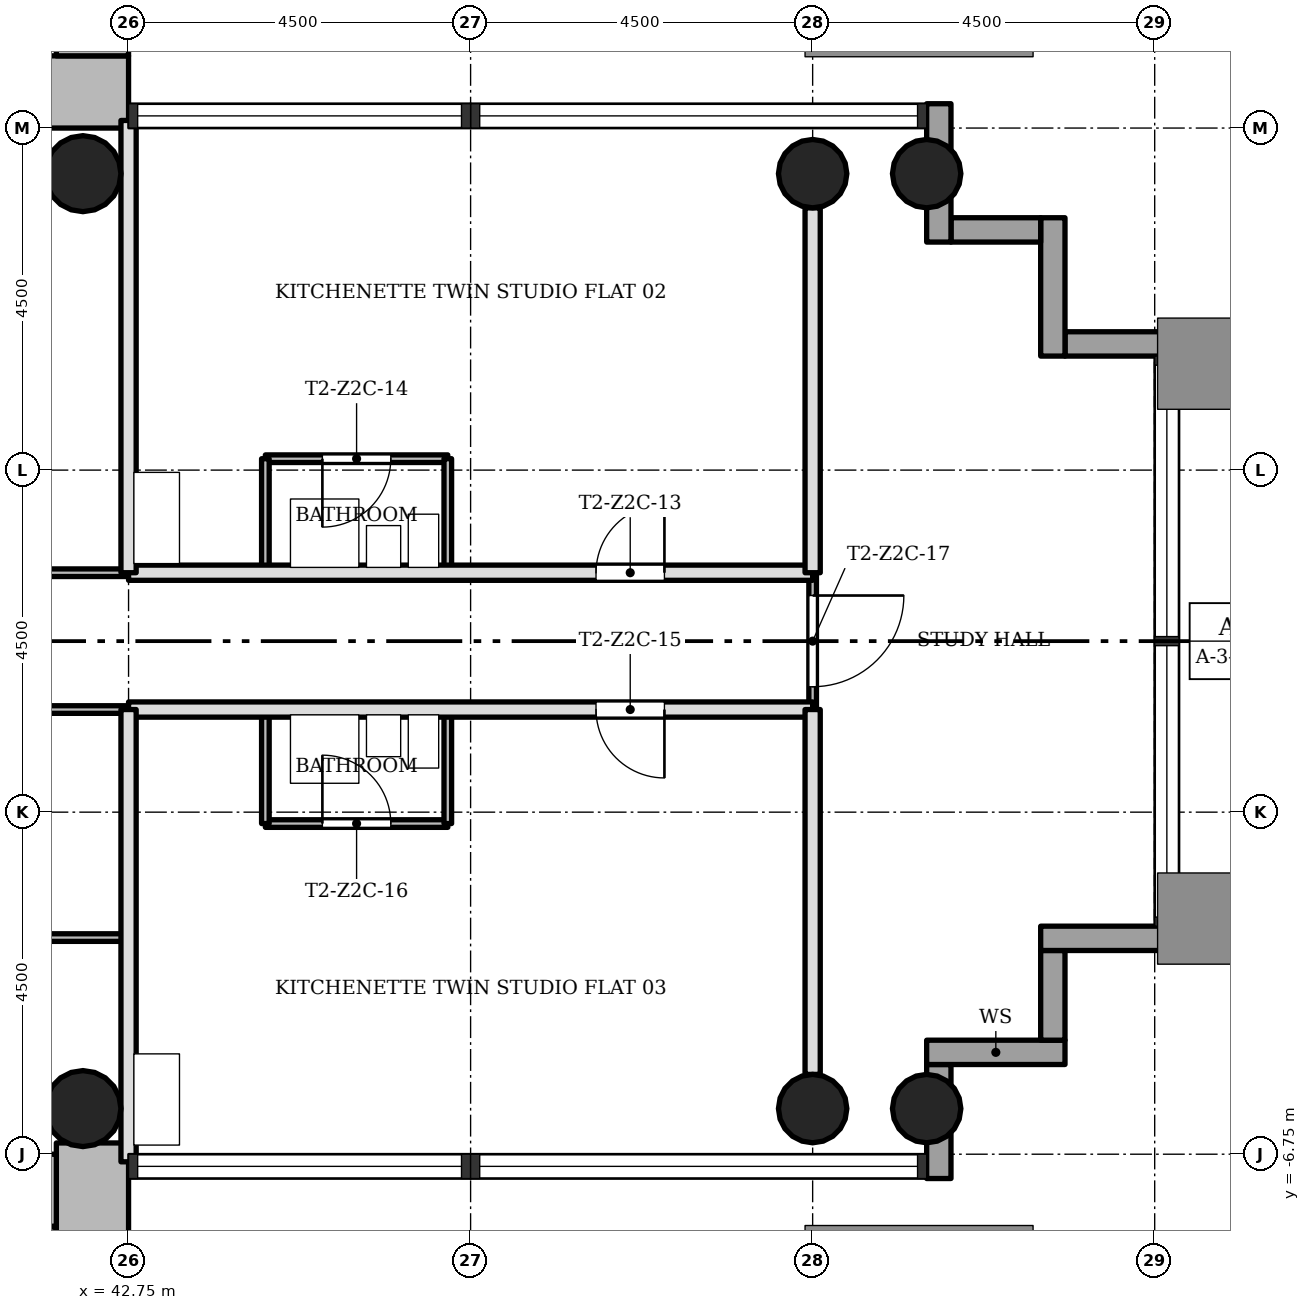
"""IFC4 building model, lengths in metres.
Left out: names, types, materials, properties, quantities, classifications, styles, units other than length and angle.
Written with IfcOpenShell. Run it as: python <this file> out.ifc"""

import sys

from ifc_helpers import new_model, si_unit, direction, frame, frame_2d, origin, origin_2d, place, context, subcontext, project, spatial, rectangle, hollow_circle, extrude, element, fill, save


model = new_model("IFC4")
c1 = context("Model", 3, precision=1e-05, world=origin(), true_north=direction((0.0, 1.0)))
c2 = subcontext(c1, "Body", "Model", "MODEL_VIEW")
j1 = project(units=[si_unit("LENGTHUNIT", "METRE"), si_unit("PLANEANGLEUNIT", "RADIAN")], contexts=[c1])
p1 = place(None, origin())
s1 = spatial("IfcSite", under=j1, at=p1, CompositionType="ELEMENT")
p2 = place(p1, origin())
s2 = spatial("IfcBuilding", under=s1, at=p2, CompositionType="ELEMENT")
p3 = place(p2, frame((0.0, 0.0, 86.8)))
s3 = spatial("IfcBuildingStorey", under=s2, at=p3, CompositionType="ELEMENT", Elevation=86.8)
p4 = place(p3, frame((30.2, 7.225, 0.0), z_axis=(0.0, 0.0, 1.0), x_axis=(1.0, 0.0, 0.0)))
e1 = element("IfcWall", 1, at=p4, inside=s3, PredefinedType="SHEAR", context=c2, shape_type="SweptSolid", body=[
    extrude(rectangle(XDim=12.55, YDim=0.95, at=frame_2d((6.275, 0.0))), origin(), (0.0, 0.0, 1.0), 3.4),
])
p5 = place(p4, frame((4.9, 0.0, 0.0)))
e2 = element("IfcOpeningElement", 2, at=p5, cuts=e1, PredefinedType="OPENING", context=c2, shape_type="SweptSolid", body=[
    extrude(rectangle(XDim=1.8, YDim=2.1, at=frame_2d((0.9, 1.05))), frame((0.0, 0.485, 0.0), z_axis=(0.0, -1.0, 0.0), x_axis=(1.0, 0.0, 0.0)), (0.0, 0.0, 1.0), 0.97),
])
p6 = place(p3, frame((42.275, 7.7, 0.0), z_axis=(0.0, 0.0, 1.0), x_axis=(0.0, 1.0, 0.0)))
e3 = element("IfcWall", 3, at=p6, inside=s3, PredefinedType="SHEAR", context=c2, shape_type="SweptSolid", body=[
    extrude(rectangle(XDim=8.05, YDim=0.95, at=frame_2d((4.025, 0.0))), origin(), (0.0, 0.0, 1.0), 3.4),
])
p7 = place(p3, frame((42.275, -14.8, 0.0), z_axis=(0.0, 0.0, 1.0), x_axis=(0.0, 1.0, 0.0)))
e4 = element("IfcWall", 4, at=p7, inside=s3, PredefinedType="SHEAR", context=c2, shape_type="SweptSolid", body=[
    extrude(rectangle(XDim=8.198, YDim=0.95, at=frame_2d((4.099, 0.0))), origin(), (0.0, 0.0, 1.0), 3.4),
])
p8 = place(p3, frame((41.8, -7.225, 0.0), z_axis=(0.0, 0.0, 1.0), x_axis=(-1.0, 0.0, 0.0)))
e5 = element("IfcWall", 5, at=p8, inside=s3, PredefinedType="SHEAR", context=c2, shape_type="SweptSolid", body=[
    extrude(rectangle(XDim=12.55, YDim=0.95, at=frame_2d((6.275, 0.0))), origin(), (0.0, 0.0, 1.0), 3.4),
])
p9 = place(p8, frame((4.9, 0.0, 0.0)))
e6 = element("IfcOpeningElement", 6, at=p9, cuts=e5, PredefinedType="OPENING", context=c2, shape_type="SweptSolid", body=[
    extrude(rectangle(XDim=1.8, YDim=2.1, at=frame_2d((0.9, 1.05))), frame((0.0, 0.485, 0.0), z_axis=(0.0, -1.0, 0.0), x_axis=(1.0, 0.0, 0.0)), (0.0, 0.0, 1.0), 0.97),
])
for number, where, z_axis, x_axis in (
    (7, (51.75, -6.15, 0.0), (0.0, 0.0, 1.0), (1.0, 0.0, 0.0)),
    (8, (51.75, 6.15, 0.0), (0.0, 0.0, 1.0), (1.0, 0.0, 0.0)),
    (9, (53.25, -6.15, 0.0), (0.0, 0.0, 1.0), (1.0, 0.0, 0.0)),
    (10, (53.25, 6.15, 0.0), (0.0, 0.0, 1.0), (1.0, 0.0, 0.0)),
):
    element("IfcColumn", number, at=place(p3, frame(where, z_axis=z_axis, x_axis=x_axis)), inside=s3, PredefinedType="COLUMN", context=c2, shape_type="SweptSolid", body=[
        extrude(hollow_circle(Radius=0.45, WallThickness=0.032, at=origin_2d()), origin(), (0.0, 0.0, 1.0), 3.4),
    ])
for number, where, z_axis, x_axis in (
    (11, (42.15, -6.15, 0.0), (0.0, 0.0, 1.0), (1.0, 0.0, 0.0)),
    (12, (42.15, 6.15, 0.0), (0.0, 0.0, 1.0), (1.0, 0.0, 0.0)),
):
    element("IfcColumn", number, at=place(p3, frame(where, z_axis=z_axis, x_axis=x_axis)), inside=s3, PredefinedType="COLUMN", context=c2, shape_type="SweptSolid", body=[
        extrude(hollow_circle(Radius=0.5, WallThickness=0.036, at=origin_2d()), origin(), (0.0, 0.0, 1.0), 3.4),
    ])
p10 = place(p3, frame((53.41, -7.07, -0.3), z_axis=(0.0, 0.0, 1.0), x_axis=(0.0, 1.0, 0.0)))
e13 = element("IfcWall", 13, at=p10, inside=s3, PredefinedType="STANDARD", context=c2, shape_type="SweptSolid", body=[
    extrude(rectangle(XDim=1.5, YDim=0.32, at=frame_2d((0.75, 0.0))), origin(), (0.0, 0.0, 1.0), 3.4),
])
p11 = place(p3, frame((53.25, -5.41, -0.3), z_axis=(0.0, 0.0, 1.0), x_axis=(1.0, 0.0, 0.0)))
e14 = element("IfcWall", 14, at=p11, inside=s3, PredefinedType="STANDARD", context=c2, shape_type="SweptSolid", body=[
    extrude(rectangle(XDim=1.82, YDim=0.32, at=frame_2d((0.91, 0.0))), origin(), (0.0, 0.0, 1.0), 3.4),
])
p12 = place(p3, frame((54.91, -5.25, -0.3), z_axis=(0.0, 0.0, 1.0), x_axis=(0.0, 1.0, 0.0)))
e15 = element("IfcWall", 15, at=p12, inside=s3, PredefinedType="STANDARD", context=c2, shape_type="SweptSolid", body=[
    extrude(rectangle(XDim=1.18, YDim=0.32, at=frame_2d((0.59, 0.0))), origin(), (0.0, 0.0, 1.0), 3.4),
])
p13 = place(p3, frame((54.75, -3.91, -0.3), z_axis=(0.0, 0.0, 1.0), x_axis=(1.0, 0.0, 0.0)))
e16 = element("IfcWall", 16, at=p13, inside=s3, PredefinedType="STANDARD", context=c2, shape_type="SweptSolid", body=[
    extrude(rectangle(XDim=1.82, YDim=0.32, at=frame_2d((0.91, 0.0))), origin(), (0.0, 0.0, 1.0), 3.4),
])
p14 = place(p3, frame((56.57, 3.91, -0.3), z_axis=(0.0, 0.0, 1.0), x_axis=(-1.0, 0.0, 0.0)))
e17 = element("IfcWall", 17, at=p14, inside=s3, PredefinedType="STANDARD", context=c2, shape_type="SweptSolid", body=[
    extrude(rectangle(XDim=1.5, YDim=0.32, at=frame_2d((0.75, 0.0))), origin(), (0.0, 0.0, 1.0), 3.4),
])
p15 = place(p3, frame((54.91, 3.75, -0.3), z_axis=(0.0, 0.0, 1.0), x_axis=(0.0, 1.0, 0.0)))
e18 = element("IfcWall", 18, at=p15, inside=s3, PredefinedType="STANDARD", context=c2, shape_type="SweptSolid", body=[
    extrude(rectangle(XDim=1.82, YDim=0.32, at=frame_2d((0.91, 0.0))), origin(), (0.0, 0.0, 1.0), 3.4),
])
p16 = place(p3, frame((54.75, 5.41, -0.3), z_axis=(0.0, 0.0, 1.0), x_axis=(-1.0, 0.0, 0.0)))
e19 = element("IfcWall", 19, at=p16, inside=s3, PredefinedType="STANDARD", context=c2, shape_type="SweptSolid", body=[
    extrude(rectangle(XDim=1.18, YDim=0.32, at=frame_2d((0.59, 0.0))), origin(), (0.0, 0.0, 1.0), 3.4),
])
p17 = place(p3, frame((53.41, 5.25, -0.3), z_axis=(0.0, 0.0, 1.0), x_axis=(0.0, 1.0, 0.0)))
e20 = element("IfcWall", 20, at=p17, inside=s3, PredefinedType="STANDARD", context=c2, shape_type="SweptSolid", body=[
    extrude(rectangle(XDim=1.82, YDim=0.32, at=frame_2d((0.91, 0.0))), origin(), (0.0, 0.0, 1.0), 3.4),
])
p18 = place(p3, frame((42.75, -3.9, 0.0), z_axis=(0.0, 0.0, 1.0), x_axis=(-1.0, 0.0, 0.0)))
e21 = element("IfcWall", 21, at=p18, inside=s3, PredefinedType="PARTITIONING", context=c2, shape_type="SweptSolid", body=[
    extrude(rectangle(XDim=5.25, YDim=0.1, at=frame_2d((2.625, 0.0))), origin(), (0.0, 0.0, 1.0), 3.0),
])
p19 = place(p3, frame((46.95, -2.4, 0.0), z_axis=(0.0, 0.0, 1.0), x_axis=(-1.0, 0.0, 0.0)))
e22 = element("IfcWall", 22, at=p19, inside=s3, PredefinedType="PARTITIONING", context=c2, shape_type="SweptSolid", body=[
    extrude(rectangle(XDim=2.4, YDim=0.1, at=frame_2d((1.2, 0.0))), origin(), (0.0, 0.0, 1.0), 3.0),
])
p20 = place(p19, frame((0.75, 0.0, 0.0)))
e23 = element("IfcOpeningElement", 23, at=p20, cuts=e22, PredefinedType="OPENING", context=c2, shape_type="SweptSolid", body=[
    extrude(rectangle(XDim=0.9, YDim=2.1, at=frame_2d((0.45, 1.05))), frame((0.0, 0.06, 0.0), z_axis=(0.0, -1.0, 0.0), x_axis=(1.0, 0.0, 0.0)), (0.0, 0.0, 1.0), 0.12),
])
p21 = place(p3, frame((42.75, -0.9, 0.0), z_axis=(0.0, 0.0, 1.0), x_axis=(-1.0, 0.0, 0.0)))
e24 = element("IfcWall", 24, at=p21, inside=s3, PredefinedType="PARTITIONING", context=c2, shape_type="SweptSolid", body=[
    extrude(rectangle(XDim=5.25, YDim=0.1, at=frame_2d((2.625, 0.0))), origin(), (0.0, 0.0, 1.0), 3.0),
])
p22 = place(p21, frame((2.175, 0.0, 0.0)))
e25 = element("IfcOpeningElement", 25, at=p22, cuts=e24, PredefinedType="OPENING", context=c2, shape_type="SweptSolid", body=[
    extrude(rectangle(XDim=0.9, YDim=2.1, at=frame_2d((0.45, 1.05))), frame((0.0, 0.06, 0.0), z_axis=(0.0, -1.0, 0.0), x_axis=(1.0, 0.0, 0.0)), (0.0, 0.0, 1.0), 0.12),
])
p23 = place(p3, frame((51.75, -0.9, 0.0), z_axis=(0.0, 0.0, 1.0), x_axis=(-1.0, 0.0, 0.0)))
e26 = element("IfcWall", 26, at=p23, inside=s3, PredefinedType="SOLIDWALL", context=c2, shape_type="SweptSolid", body=[
    extrude(rectangle(XDim=9.0, YDim=0.2, at=frame_2d((4.5, 0.0))), origin(), (0.0, 0.0, 1.0), 3.0),
])
p24 = place(p23, frame((1.95, 0.0, 0.0)))
e27 = element("IfcOpeningElement", 27, at=p24, cuts=e26, PredefinedType="OPENING", context=c2, shape_type="SweptSolid", body=[
    extrude(rectangle(XDim=0.9, YDim=2.1, at=frame_2d((0.45, 1.05))), frame((0.0, 0.11, 0.0), z_axis=(0.0, -1.0, 0.0), x_axis=(1.0, 0.0, 0.0)), (0.0, 0.0, 1.0), 0.22),
])
p25 = place(p3, frame((42.75, 0.9, 0.0), z_axis=(0.0, 0.0, 1.0), x_axis=(-1.0, 0.0, 0.0)))
e28 = element("IfcWall", 28, at=p25, inside=s3, PredefinedType="PARTITIONING", context=c2, shape_type="SweptSolid", body=[
    extrude(rectangle(XDim=5.25, YDim=0.1, at=frame_2d((2.625, 0.0))), origin(), (0.0, 0.0, 1.0), 3.0),
])
p26 = place(p25, frame((3.6, 0.0, 0.0)))
e29 = element("IfcOpeningElement", 29, at=p26, cuts=e28, PredefinedType="OPENING", context=c2, shape_type="SweptSolid", body=[
    extrude(rectangle(XDim=0.9, YDim=2.1, at=frame_2d((0.45, 1.05))), frame((0.0, 0.06, 0.0), z_axis=(0.0, -1.0, 0.0), x_axis=(1.0, 0.0, 0.0)), (0.0, 0.0, 1.0), 0.12),
])
p27 = place(p3, frame((51.75, 0.9, 0.0), z_axis=(0.0, 0.0, 1.0), x_axis=(-1.0, 0.0, 0.0)))
e30 = element("IfcWall", 30, at=p27, inside=s3, PredefinedType="SOLIDWALL", context=c2, shape_type="SweptSolid", body=[
    extrude(rectangle(XDim=9.0, YDim=0.2, at=frame_2d((4.5, 0.0))), origin(), (0.0, 0.0, 1.0), 3.0),
])
p28 = place(p27, frame((1.95, 0.0, 0.0)))
e31 = element("IfcOpeningElement", 31, at=p28, cuts=e30, PredefinedType="OPENING", context=c2, shape_type="SweptSolid", body=[
    extrude(rectangle(XDim=0.9, YDim=2.1, at=frame_2d((0.45, 1.05))), frame((0.0, 0.11, 0.0), z_axis=(0.0, -1.0, 0.0), x_axis=(1.0, 0.0, 0.0)), (0.0, 0.0, 1.0), 0.22),
])
p29 = place(p3, frame((46.95, 2.4, 0.0), z_axis=(0.0, 0.0, 1.0), x_axis=(-1.0, 0.0, 0.0)))
e32 = element("IfcWall", 32, at=p29, inside=s3, PredefinedType="PARTITIONING", context=c2, shape_type="SweptSolid", body=[
    extrude(rectangle(XDim=2.4, YDim=0.1, at=frame_2d((1.2, 0.0))), origin(), (0.0, 0.0, 1.0), 3.0),
])
p30 = place(p29, frame((0.75, 0.0, 0.0)))
e33 = element("IfcOpeningElement", 33, at=p30, cuts=e32, PredefinedType="OPENING", context=c2, shape_type="SweptSolid", body=[
    extrude(rectangle(XDim=0.9, YDim=2.1, at=frame_2d((0.45, 1.05))), frame((0.0, 0.06, 0.0), z_axis=(0.0, -1.0, 0.0), x_axis=(1.0, 0.0, 0.0)), (0.0, 0.0, 1.0), 0.12),
])
p31 = place(p3, frame((51.75, -0.9, 0.0), z_axis=(0.0, 0.0, 1.0), x_axis=(0.0, 1.0, 0.0)))
e34 = element("IfcWall", 34, at=p31, inside=s3, PredefinedType="PARTITIONING", context=c2, shape_type="SweptSolid", body=[
    extrude(rectangle(XDim=1.8, YDim=0.1, at=frame_2d((0.9, 0.0))), origin(), (0.0, 0.0, 1.0), 3.0),
])
p32 = place(p31, frame((0.3, 0.0, 0.0)))
e35 = element("IfcOpeningElement", 35, at=p32, cuts=e34, PredefinedType="OPENING", context=c2, shape_type="SweptSolid", body=[
    extrude(rectangle(XDim=1.2, YDim=2.1, at=frame_2d((0.6, 1.05))), frame((0.0, 0.06, 0.0), z_axis=(0.0, -1.0, 0.0), x_axis=(1.0, 0.0, 0.0)), (0.0, 0.0, 1.0), 0.12),
])
for number, where, z_axis, x_axis in (
    (36, (51.75, -5.7, 0.0), (0.0, 0.0, 1.0), (0.0, 1.0, 0.0)),
    (37, (51.75, 0.9, 0.0), (0.0, 0.0, 1.0), (0.0, 1.0, 0.0)),
):
    element("IfcWall", number, at=place(p3, frame(where, z_axis=z_axis, x_axis=x_axis)), inside=s3, PredefinedType="SOLIDWALL", context=c2, shape_type="SweptSolid", body=[
        extrude(rectangle(XDim=4.8, YDim=0.2, at=frame_2d((2.4, 0.0))), origin(), (0.0, 0.0, 1.0), 3.0),
    ])
for number, where, z_axis, x_axis in (
    (38, (46.95, -2.4, 0.0), (0.0, 0.0, 1.0), (0.0, 1.0, 0.0)),
    (39, (46.95, 0.9, 0.0), (0.0, 0.0, 1.0), (0.0, 1.0, 0.0)),
    (40, (44.55, -2.4, 0.0), (0.0, 0.0, 1.0), (0.0, 1.0, 0.0)),
    (41, (44.55, 0.9, 0.0), (0.0, 0.0, 1.0), (0.0, 1.0, 0.0)),
):
    element("IfcWall", number, at=place(p3, frame(where, z_axis=z_axis, x_axis=x_axis)), inside=s3, PredefinedType="PARTITIONING", context=c2, shape_type="SweptSolid", body=[
        extrude(rectangle(XDim=1.5, YDim=0.1, at=frame_2d((0.75, 0.0))), origin(), (0.0, 0.0, 1.0), 3.0),
    ])
for number, where, z_axis, x_axis in (
    (42, (42.75, -6.85, 0.0), (0.0, 0.0, 1.0), (0.0, 1.0, 0.0)),
    (43, (42.75, 0.9, 0.0), (0.0, 0.0, 1.0), (0.0, 1.0, 0.0)),
):
    element("IfcWall", number, at=place(p3, frame(where, z_axis=z_axis, x_axis=x_axis)), inside=s3, PredefinedType="SOLIDWALL", context=c2, shape_type="SweptSolid", body=[
        extrude(rectangle(XDim=5.95, YDim=0.2, at=frame_2d((2.975, 0.0))), origin(), (0.0, 0.0, 1.0), 3.0),
    ])
p33 = place(p3, frame((37.9, -7.825, 0.0), z_axis=(0.0, 0.0, 1.0), x_axis=(1.0, 0.0, 0.0)))
e44 = element("IfcWall", 44, at=p33, inside=s3, PredefinedType="SHEAR", context=c2, shape_type="SweptSolid", body=[
    extrude(rectangle(XDim=3.9, YDim=0.25, at=frame_2d((1.95, 0.0))), origin(), (0.0, 0.0, 1.0), 3.4),
])
p34 = place(p28, origin())
e45 = element("IfcDoor", 45, at=p34, inside=s3, OperationType="SINGLE_SWING_LEFT", PredefinedType="DOOR", context=c2, shape_type="SweptSolid", body=[
    extrude(rectangle(XDim=0.9, YDim=2.1, at=frame_2d((0.45, 1.05))), frame((0.0, 0.025, 0.0), z_axis=(0.0, -1.0, 0.0), x_axis=(1.0, 0.0, 0.0)), (0.0, 0.0, 1.0), 0.05),
])
fill(e31, e45)
p35 = place(p30, origin())
e46 = element("IfcDoor", 46, at=p35, inside=s3, OperationType="SINGLE_SWING_LEFT", PredefinedType="DOOR", context=c2, shape_type="SweptSolid", body=[
    extrude(rectangle(XDim=0.9, YDim=2.1, at=frame_2d((0.45, 1.05))), frame((0.0, 0.025, 0.0), z_axis=(0.0, -1.0, 0.0), x_axis=(1.0, 0.0, 0.0)), (0.0, 0.0, 1.0), 0.05),
])
fill(e33, e46)
p36 = place(p24, origin())
e47 = element("IfcDoor", 47, at=p36, inside=s3, OperationType="SINGLE_SWING_RIGHT", PredefinedType="DOOR", context=c2, shape_type="SweptSolid", body=[
    extrude(rectangle(XDim=0.9, YDim=2.1, at=frame_2d((0.45, 1.05))), frame((0.0, 0.025, 0.0), z_axis=(0.0, -1.0, 0.0), x_axis=(1.0, 0.0, 0.0)), (0.0, 0.0, 1.0), 0.05),
])
fill(e27, e47)
p37 = place(p20, origin())
e48 = element("IfcDoor", 48, at=p37, inside=s3, OperationType="SINGLE_SWING_RIGHT", PredefinedType="DOOR", context=c2, shape_type="SweptSolid", body=[
    extrude(rectangle(XDim=0.9, YDim=2.1, at=frame_2d((0.45, 1.05))), frame((0.0, 0.025, 0.0), z_axis=(0.0, -1.0, 0.0), x_axis=(1.0, 0.0, 0.0)), (0.0, 0.0, 1.0), 0.05),
])
fill(e23, e48)
p38 = place(p32, origin())
e49 = element("IfcDoor", 49, at=p38, inside=s3, OperationType="SINGLE_SWING_RIGHT", PredefinedType="DOOR", context=c2, shape_type="SweptSolid", body=[
    extrude(rectangle(XDim=1.2, YDim=2.1, at=frame_2d((0.6, 1.05))), frame((0.0, 0.025, 0.0), z_axis=(0.0, -1.0, 0.0), x_axis=(1.0, 0.0, 0.0)), (0.0, 0.0, 1.0), 0.05),
])
fill(e35, e49)
save(model, sys.argv[1])
